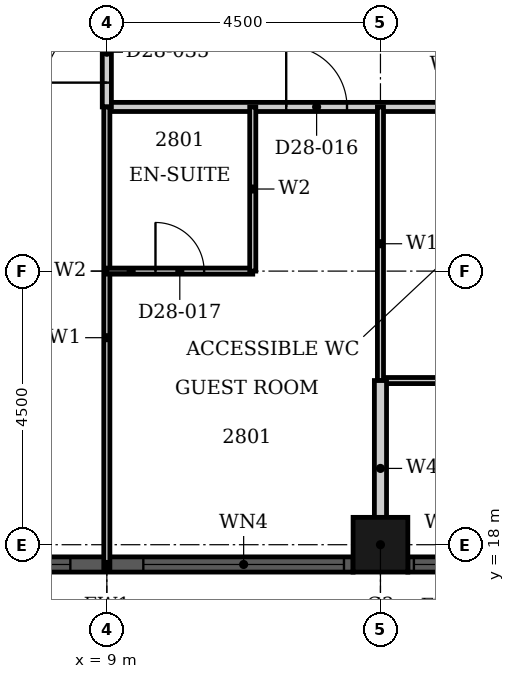
"""IFC4 building model, lengths in metres.
Left out: names, types, materials, properties, quantities, classifications, styles, units other than length and angle.
Written with IfcOpenShell. Run it as: python <this file> out.ifc"""

import sys

from ifc_helpers import new_model, si_unit, direction, frame, frame_2d, origin, origin_2d, place, context, subcontext, project, spatial, rectangle, hollow_rectangle, extrude, element, fill, save


model = new_model("IFC4")
c1 = context("Model", 3, precision=1e-05, world=origin(), true_north=direction((0.0, 1.0)))
c2 = subcontext(c1, "Body", "Model", "MODEL_VIEW")
j1 = project(units=[si_unit("LENGTHUNIT", "METRE"), si_unit("PLANEANGLEUNIT", "RADIAN")], contexts=[c1])
p1 = place(None, origin())
s1 = spatial("IfcSite", under=j1, at=p1, CompositionType="ELEMENT")
p2 = place(p1, origin())
s2 = spatial("IfcBuilding", under=s1, at=p2, CompositionType="ELEMENT")
p3 = place(p2, frame((0.0, 0.0, 115.2)))
s3 = spatial("IfcBuildingStorey", under=s2, at=p3, CompositionType="ELEMENT", Elevation=115.2)
p4 = place(p3, frame((13.5, 18.0, 0.0), z_axis=(0.0, 0.0, 1.0), x_axis=(1.0, 0.0, 0.0)))
e1 = element("IfcColumn", 1, at=p4, inside=s3, PredefinedType="COLUMN", context=c2, shape_type="SweptSolid", body=[
    extrude(hollow_rectangle(XDim=0.9, YDim=0.9, WallThickness=0.028, at=origin_2d()), origin(), (0.0, 0.0, 1.0), 3.6),
])
p5 = place(p3, frame((4.95, 17.675, 0.0), z_axis=(0.0, 0.0, 1.0), x_axis=(1.0, 0.0, 0.0)))
e2 = element("IfcWall", 2, at=p5, inside=s3, PredefinedType="SOLIDWALL", context=c2, shape_type="SweptSolid", body=[
    extrude(rectangle(XDim=8.1, YDim=0.25, at=frame_2d((4.05, 0.0))), origin(), (0.0, 0.0, 1.0), 3.6),
])
p6 = place(p5, frame((0.15, 0.0, 0.9)))
e3 = element("IfcOpeningElement", 3, at=p6, cuts=e2, PredefinedType="OPENING", context=c2, shape_type="SweptSolid", body=[
    extrude(rectangle(XDim=3.3, YDim=2.08, at=frame_2d((1.65, 1.04))), frame((0.0, 0.135, 0.0), z_axis=(0.0, -1.0, 0.0), x_axis=(1.0, 0.0, 0.0)), (0.0, 0.0, 1.0), 0.27),
])
p7 = place(p5, frame((4.65, 0.0, 0.9)))
e4 = element("IfcOpeningElement", 4, at=p7, cuts=e2, PredefinedType="OPENING", context=c2, shape_type="SweptSolid", body=[
    extrude(rectangle(XDim=3.3, YDim=2.08, at=frame_2d((1.65, 1.04))), frame((0.0, 0.135, 0.0), z_axis=(0.0, -1.0, 0.0), x_axis=(1.0, 0.0, 0.0)), (0.0, 0.0, 1.0), 0.27),
])
p8 = place(p3, frame((13.95, 17.675, 0.0), z_axis=(0.0, 0.0, 1.0), x_axis=(1.0, 0.0, 0.0)))
e5 = element("IfcWall", 5, at=p8, inside=s3, PredefinedType="SOLIDWALL", context=c2, shape_type="SweptSolid", body=[
    extrude(rectangle(XDim=1.35, YDim=0.25, at=frame_2d((0.675, 0.0))), origin(), (0.0, 0.0, 1.0), 3.6),
])
p9 = place(p8, frame((0.1, 0.0, 0.9)))
e6 = element("IfcOpeningElement", 6, at=p9, cuts=e5, PredefinedType="OPENING", context=c2, shape_type="SweptSolid", body=[
    extrude(rectangle(XDim=1.15, YDim=2.08, at=frame_2d((0.575, 1.04))), frame((0.0, 0.135, 0.0), z_axis=(0.0, -1.0, 0.0), x_axis=(1.0, 0.0, 0.0)), (0.0, 0.0, 1.0), 0.27),
])
p10 = place(p3, frame((9.0, 25.2, 0.0), z_axis=(0.0, 0.0, 1.0), x_axis=(1.0, 0.0, 0.0)))
e7 = element("IfcWall", 7, at=p10, inside=s3, PredefinedType="PARTITIONING", context=c2, shape_type="SweptSolid", body=[
    extrude(rectangle(XDim=7.2, YDim=0.15, at=frame_2d((3.6, 0.0))), origin(), (0.0, 0.0, 1.0), 3.3),
])
p11 = place(p10, frame((2.95, 0.0, 0.0)))
e8 = element("IfcOpeningElement", 8, at=p11, cuts=e7, PredefinedType="OPENING", context=c2, shape_type="SweptSolid", body=[
    extrude(rectangle(XDim=1.0, YDim=2.1, at=frame_2d((0.5, 1.05))), frame((0.0, 0.085, 0.0), z_axis=(0.0, -1.0, 0.0), x_axis=(1.0, 0.0, 0.0)), (0.0, 0.0, 1.0), 0.17),
])
p12 = place(p3, frame((9.0, 25.2, 0.0), z_axis=(0.0, 0.0, 1.0), x_axis=(0.0, 1.0, 0.0)))
e9 = element("IfcWall", 9, at=p12, inside=s3, PredefinedType="PARTITIONING", context=c2, shape_type="SweptSolid", body=[
    extrude(rectangle(XDim=1.8, YDim=0.15, at=frame_2d((0.9, 0.0))), origin(), (0.0, 0.0, 1.0), 3.3),
])
p13 = place(p12, frame((0.4, 0.0, 0.0)))
e10 = element("IfcOpeningElement", 10, at=p13, cuts=e9, PredefinedType="OPENING", context=c2, shape_type="SweptSolid", body=[
    extrude(rectangle(XDim=1.0, YDim=2.1, at=frame_2d((0.5, 1.05))), frame((0.0, 0.085, 0.0), z_axis=(0.0, -1.0, 0.0), x_axis=(1.0, 0.0, 0.0)), (0.0, 0.0, 1.0), 0.17),
])
p14 = place(p3, frame((13.5, 20.7, 0.0), z_axis=(0.0, 0.0, 1.0), x_axis=(1.0, 0.0, 0.0)))
e11 = element("IfcWall", 11, at=p14, inside=s3, PredefinedType="PARTITIONING", context=c2, shape_type="SweptSolid", body=[
    extrude(rectangle(XDim=2.7, YDim=0.1, at=frame_2d((1.35, 0.0))), origin(), (0.0, 0.0, 1.0), 3.3),
])
p15 = place(p3, frame((13.5, 20.7, 0.0), z_axis=(0.0, 0.0, 1.0), x_axis=(0.0, 1.0, 0.0)))
e12 = element("IfcWall", 12, at=p15, inside=s3, PredefinedType="PARTITIONING", context=c2, shape_type="SweptSolid", body=[
    extrude(rectangle(XDim=4.5, YDim=0.1, at=frame_2d((2.25, 0.0))), origin(), (0.0, 0.0, 1.0), 2.38),
])
p16 = place(p3, frame((9.0, 17.61, 0.0), z_axis=(0.0, 0.0, 1.0), x_axis=(0.0, 1.0, 0.0)))
e13 = element("IfcWall", 13, at=p16, inside=s3, PredefinedType="PARTITIONING", context=c2, shape_type="SweptSolid", body=[
    extrude(rectangle(XDim=7.59, YDim=0.1, at=frame_2d((3.795, 0.0))), origin(), (0.0, 0.0, 1.0), 3.3),
])
p17 = place(p3, frame((13.5, 17.81, 0.0), z_axis=(0.0, 0.0, 1.0), x_axis=(0.0, 1.0, 0.0)))
e14 = element("IfcWall", 14, at=p17, inside=s3, PredefinedType="PARTITIONING", context=c2, shape_type="SweptSolid", body=[
    extrude(rectangle(XDim=2.89, YDim=0.2, at=frame_2d((1.445, 0.0))), origin(), (0.0, 0.0, 1.0), 2.38),
])
p18 = place(p3, frame((9.0, 22.5, 0.0), z_axis=(0.0, 0.0, 1.0), x_axis=(1.0, 0.0, 0.0)))
e15 = element("IfcWall", 15, at=p18, inside=s3, PredefinedType="PARTITIONING", context=c2, shape_type="SweptSolid", body=[
    extrude(rectangle(XDim=2.4, YDim=0.1, at=frame_2d((1.2, 0.0))), origin(), (0.0, 0.0, 1.0), 2.58),
])
p19 = place(p18, frame((0.8, 0.0, 0.0)))
e16 = element("IfcOpeningElement", 16, at=p19, cuts=e15, PredefinedType="OPENING", context=c2, shape_type="SweptSolid", body=[
    extrude(rectangle(XDim=0.8, YDim=2.1, at=frame_2d((0.4, 1.05))), frame((0.0, 0.06, 0.0), z_axis=(0.0, -1.0, 0.0), x_axis=(1.0, 0.0, 0.0)), (0.0, 0.0, 1.0), 0.12),
])
p20 = place(p3, frame((11.4, 22.5, 0.0), z_axis=(0.0, 0.0, 1.0), x_axis=(0.0, 1.0, 0.0)))
e17 = element("IfcWall", 17, at=p20, inside=s3, PredefinedType="PARTITIONING", context=c2, shape_type="SweptSolid", body=[
    extrude(rectangle(XDim=2.7, YDim=0.1, at=frame_2d((1.35, 0.0))), origin(), (0.0, 0.0, 1.0), 3.3),
])
p21 = place(p6, origin())
e18 = element("IfcWindow", 18, at=p21, inside=s3, PartitioningType="SINGLE_PANEL", PredefinedType="WINDOW", context=c2, shape_type="SweptSolid", body=[
    extrude(rectangle(XDim=3.3, YDim=2.08, at=frame_2d((1.65, 1.04))), frame((0.0, 0.03, 0.0), z_axis=(0.0, -1.0, 0.0), x_axis=(1.0, 0.0, 0.0)), (0.0, 0.0, 1.0), 0.06),
])
fill(e3, e18)
p22 = place(p7, origin())
e19 = element("IfcWindow", 19, at=p22, inside=s3, PartitioningType="SINGLE_PANEL", PredefinedType="WINDOW", context=c2, shape_type="SweptSolid", body=[
    extrude(rectangle(XDim=3.3, YDim=2.08, at=frame_2d((1.65, 1.04))), frame((0.0, 0.03, 0.0), z_axis=(0.0, -1.0, 0.0), x_axis=(1.0, 0.0, 0.0)), (0.0, 0.0, 1.0), 0.06),
])
fill(e4, e19)
p23 = place(p9, origin())
e20 = element("IfcWindow", 20, at=p23, inside=s3, PartitioningType="SINGLE_PANEL", PredefinedType="WINDOW", context=c2, shape_type="SweptSolid", body=[
    extrude(rectangle(XDim=1.15, YDim=2.08, at=frame_2d((0.575, 1.04))), frame((0.0, 0.03, 0.0), z_axis=(0.0, -1.0, 0.0), x_axis=(1.0, 0.0, 0.0)), (0.0, 0.0, 1.0), 0.06),
])
fill(e6, e20)
p24 = place(p11, origin())
e21 = element("IfcDoor", 21, at=p24, inside=s3, OperationType="SINGLE_SWING_RIGHT", PredefinedType="DOOR", context=c2, shape_type="SweptSolid", body=[
    extrude(rectangle(XDim=1.0, YDim=2.1, at=frame_2d((0.5, 1.05))), frame((0.0, 0.025, 0.0), z_axis=(0.0, -1.0, 0.0), x_axis=(1.0, 0.0, 0.0)), (0.0, 0.0, 1.0), 0.05),
])
fill(e8, e21)
p25 = place(p19, origin())
e22 = element("IfcDoor", 22, at=p25, inside=s3, OperationType="SINGLE_SWING_RIGHT", PredefinedType="DOOR", context=c2, shape_type="SweptSolid", body=[
    extrude(rectangle(XDim=0.8, YDim=2.1, at=frame_2d((0.4, 1.05))), frame((0.0, 0.025, 0.0), z_axis=(0.0, -1.0, 0.0), x_axis=(1.0, 0.0, 0.0)), (0.0, 0.0, 1.0), 0.05),
])
fill(e16, e22)
p26 = place(p13, origin())
e23 = element("IfcDoor", 23, at=p26, inside=s3, OperationType="SINGLE_SWING_LEFT", PredefinedType="DOOR", context=c2, shape_type="SweptSolid", body=[
    extrude(rectangle(XDim=1.0, YDim=2.1, at=frame_2d((0.5, 1.05))), frame((0.0, 0.025, 0.0), z_axis=(0.0, -1.0, 0.0), x_axis=(1.0, 0.0, 0.0)), (0.0, 0.0, 1.0), 0.05),
])
fill(e10, e23)
save(model, sys.argv[1])
